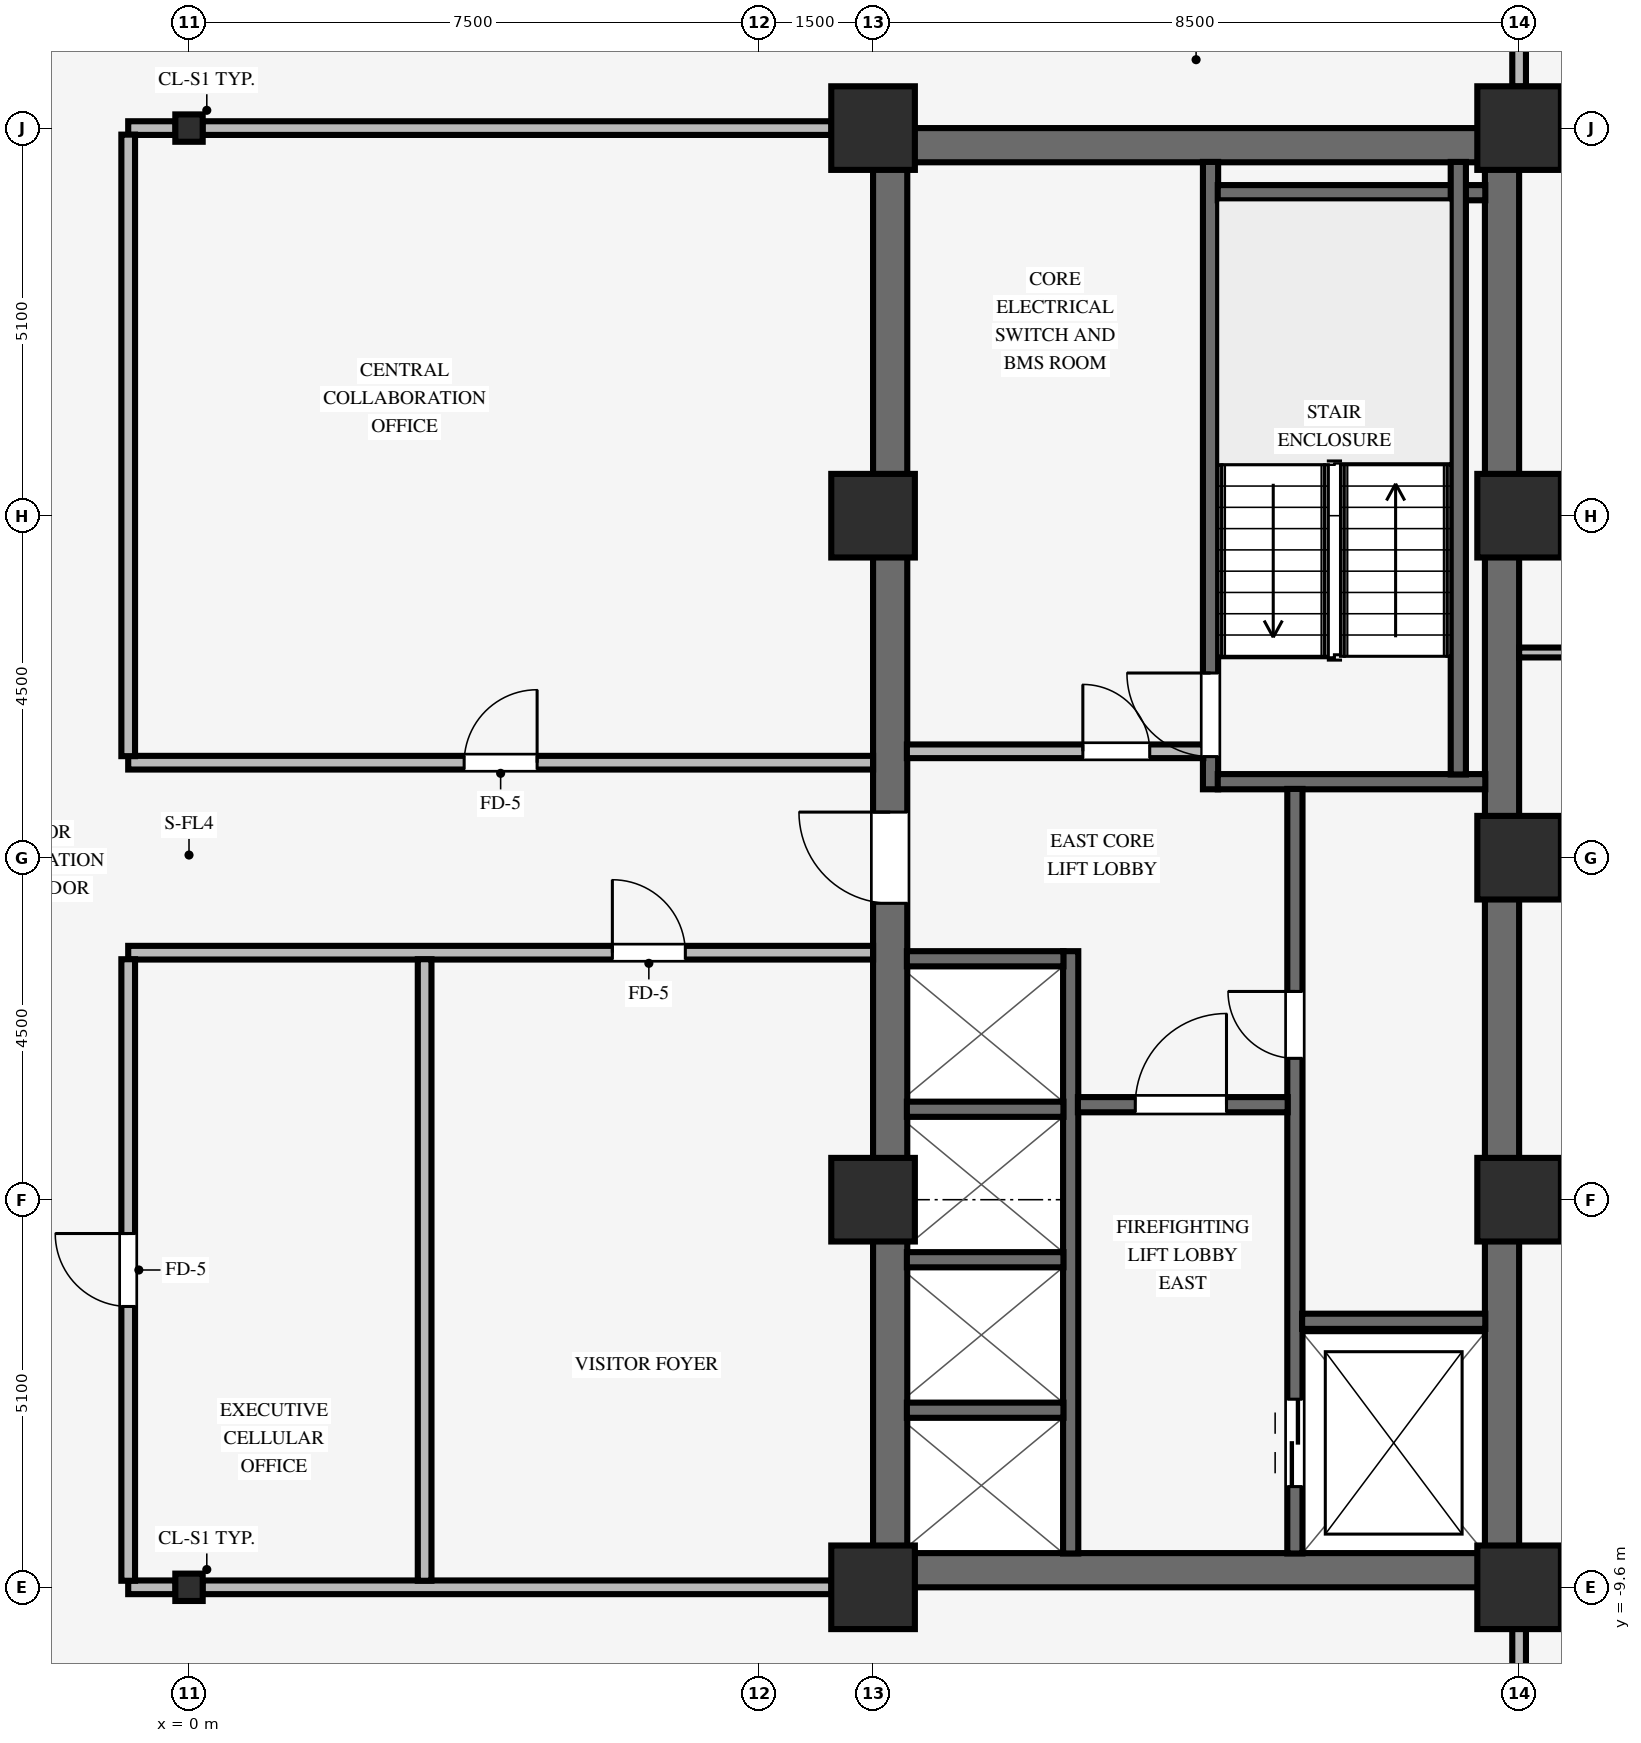
"""IFC4 building model, lengths in metres.
Left out: names, types, materials, properties, quantities, classifications, styles, units other than length and angle.
Written with IfcOpenShell. Run it as: python <this file> out.ifc"""

import sys

from ifc_helpers import new_model, si_unit, direction, frame, frame_2d, origin, origin_2d, place, context, subcontext, project, spatial, rectangle, i_section, extrude, source, transform, mapped, element, fill, save


model = new_model("IFC4")
c1 = context("Model", 3, precision=1e-05, world=origin(), true_north=direction((0.0, 1.0)))
c2 = subcontext(c1, "Body", "Model", "MODEL_VIEW")
j1 = project(units=[si_unit("LENGTHUNIT", "METRE"), si_unit("PLANEANGLEUNIT", "RADIAN")], contexts=[c1])
p1 = place(None, origin())
s1 = spatial("IfcSite", under=j1, at=p1, CompositionType="ELEMENT")
p2 = place(p1, origin())
s2 = spatial("IfcBuilding", under=s1, at=p2, CompositionType="ELEMENT")
p3 = place(p2, frame((0.0, 0.0, 89.65)))
s3 = spatial("IfcBuildingStorey", under=s2, at=p3, CompositionType="ELEMENT", Elevation=89.65)
for number, where, z_axis, x_axis in (
    (1, (9.0, -9.375, 0.0), (0.0, 0.0, 1.0), (1.0, 0.0, 0.0)),
    (2, (9.0, 9.375, 0.0), (0.0, 0.0, 1.0), (1.0, 0.0, 0.0)),
):
    element("IfcWall", number, at=place(p3, frame(where, z_axis=z_axis, x_axis=x_axis)), inside=s3, PredefinedType="SHEAR", context=c2, shape_type="SweptSolid", body=[
        extrude(rectangle(XDim=8.5, YDim=0.45, at=frame_2d((4.25, 0.0))), origin(), (0.0, 0.0, 1.0), 3.25),
    ])
p4 = place(p3, frame((9.225, -9.155, 0.0), z_axis=(0.0, 0.0, 1.0), x_axis=(0.0, 1.0, 0.0)))
e3 = element("IfcWall", 3, at=p4, inside=s3, PredefinedType="SHEAR", context=c2, shape_type="SweptSolid", body=[
    extrude(rectangle(XDim=18.31, YDim=0.45, at=frame_2d((9.155, 0.0))), origin(), (0.0, 0.0, 1.0), 3.25),
])
p5 = place(p4, frame((8.555, 0.0, 0.0)))
e4 = element("IfcOpeningElement", 4, at=p5, cuts=e3, PredefinedType="OPENING", context=c2, shape_type="SweptSolid", body=[
    extrude(rectangle(XDim=1.2, YDim=2.15, at=frame_2d((0.6, 1.075))), frame((0.0, 0.235, 0.0), z_axis=(0.0, -1.0, 0.0), x_axis=(1.0, 0.0, 0.0)), (0.0, 0.0, 1.0), 0.47),
])
p6 = place(p3, frame((17.275, -9.155, 0.0), z_axis=(0.0, 0.0, 1.0), x_axis=(0.0, 1.0, 0.0)))
e5 = element("IfcWall", 5, at=p6, inside=s3, PredefinedType="SHEAR", context=c2, shape_type="SweptSolid", body=[
    extrude(rectangle(XDim=18.31, YDim=0.45, at=frame_2d((9.155, 0.0))), origin(), (0.0, 0.0, 1.0), 3.25),
])
for number, where, z_axis, x_axis in (
    (6, (9.0, -9.6, 0.0), (0.0, 0.0, 1.0), (1.0, 0.0, 0.0)),
    (7, (9.0, -4.5, 0.0), (0.0, 0.0, 1.0), (1.0, 0.0, 0.0)),
    (8, (9.0, 4.5, 0.0), (0.0, 0.0, 1.0), (1.0, 0.0, 0.0)),
    (9, (9.0, 9.6, 0.0), (0.0, 0.0, 1.0), (1.0, 0.0, 0.0)),
    (10, (17.5, -9.6, 0.0), (0.0, 0.0, 1.0), (1.0, 0.0, 0.0)),
    (11, (17.5, -4.5, 0.0), (0.0, 0.0, 1.0), (1.0, 0.0, 0.0)),
    (12, (17.5, 4.5, 0.0), (0.0, 0.0, 1.0), (1.0, 0.0, 0.0)),
    (13, (17.5, 9.6, 0.0), (0.0, 0.0, 1.0), (1.0, 0.0, 0.0)),
    (14, (17.5, 0.0, 0.0), (0.0, 0.0, 1.0), (1.0, 0.0, 0.0)),
):
    element("IfcColumn", number, at=place(p3, frame(where, z_axis=z_axis, x_axis=x_axis)), inside=s3, PredefinedType="COLUMN", context=c2, shape_type="SweptSolid", body=[
        extrude(rectangle(XDim=1.1, YDim=1.1, at=origin_2d()), origin(), (0.0, 0.0, 1.0), 3.25),
    ])
for number, where, z_axis, x_axis in (
    (15, (0.0, -9.6, 0.0), (0.0, 0.0, 1.0), (1.0, 0.0, 0.0)),
    (16, (0.0, 9.6, 0.0), (0.0, 0.0, 1.0), (1.0, 0.0, 0.0)),
):
    element("IfcColumn", number, at=place(p3, frame(where, z_axis=z_axis, x_axis=x_axis)), inside=s3, PredefinedType="COLUMN", context=c2, shape_type="SweptSolid", body=[
        extrude(i_section(OverallWidth=0.36, OverallDepth=0.36, WebThickness=0.021, FlangeThickness=0.021, FilletRadius=0.018, at=origin_2d()), origin(), (0.0, 0.0, 1.0), 3.25),
    ])
p7 = place(p3, frame((13.44, 0.9, 0.0), z_axis=(0.0, 0.0, 1.0), x_axis=(0.0, 1.0, 0.0)))
e17 = element("IfcWall", 17, at=p7, inside=s3, PredefinedType="SHEAR", context=c2, shape_type="SweptSolid", body=[
    extrude(rectangle(XDim=8.255, YDim=0.2, at=frame_2d((4.127, 0.0))), origin(), (0.0, 0.0, 1.0), 3.25),
])
p8 = place(p7, frame((0.43, 0.0, 0.0)))
e18 = element("IfcOpeningElement", 18, at=p8, cuts=e17, PredefinedType="OPENING", context=c2, shape_type="SweptSolid", body=[
    extrude(rectangle(XDim=1.1, YDim=2.15, at=frame_2d((0.55, 1.075))), frame((0.0, 0.11, 0.0), z_axis=(0.0, -1.0, 0.0), x_axis=(1.0, 0.0, 0.0)), (0.0, 0.0, 1.0), 0.22),
])
for number, where, z_axis, x_axis in (
    (19, (13.535, 1.0, 0.0), (0.0, 0.0, 1.0), (1.0, 0.0, 0.0)),
    (20, (13.535, 8.75, 0.0), (0.0, 0.0, 1.0), (1.0, 0.0, 0.0)),
):
    element("IfcWall", number, at=place(p3, frame(where, z_axis=z_axis, x_axis=x_axis)), inside=s3, PredefinedType="SHEAR", context=c2, shape_type="SweptSolid", body=[
        extrude(rectangle(XDim=3.52, YDim=0.2, at=frame_2d((1.76, 0.0))), origin(), (0.0, 0.0, 1.0), 3.25),
    ])
p9 = place(p3, frame((16.7, 1.095, 0.0), z_axis=(0.0, 0.0, 1.0), x_axis=(0.0, 1.0, 0.0)))
e21 = element("IfcWall", 21, at=p9, inside=s3, PredefinedType="SHEAR", context=c2, shape_type="SweptSolid", body=[
    extrude(rectangle(XDim=8.06, YDim=0.2, at=frame_2d((4.03, 0.0))), origin(), (0.0, 0.0, 1.0), 3.25),
])
p10 = place(p3, frame((14.55, -9.155, 0.0), z_axis=(0.0, 0.0, 1.0), x_axis=(0.0, 1.0, 0.0)))
e22 = element("IfcWall", 22, at=p10, inside=s3, PredefinedType="SHEAR", context=c2, shape_type="SweptSolid", body=[
    extrude(rectangle(XDim=10.06, YDim=0.2, at=frame_2d((5.03, 0.0))), origin(), (0.0, 0.0, 1.0), 3.25),
])
p11 = place(p10, frame((6.515, 0.0, 0.0)))
e23 = element("IfcOpeningElement", 23, at=p11, cuts=e22, PredefinedType="OPENING", context=c2, shape_type="SweptSolid", body=[
    extrude(rectangle(XDim=0.88, YDim=2.1, at=frame_2d((0.44, 1.05))), frame((0.0, 0.11, 0.0), z_axis=(0.0, -1.0, 0.0), x_axis=(1.0, 0.0, 0.0)), (0.0, 0.0, 1.0), 0.22),
])
p12 = place(p10, frame((0.88, 0.0, 0.0)))
e24 = element("IfcOpeningElement", 24, at=p12, cuts=e22, PredefinedType="OPENING", context=c2, shape_type="SweptSolid", body=[
    extrude(rectangle(XDim=1.15, YDim=2.15, at=frame_2d((0.575, 1.075))), frame((0.0, 0.11, 0.0), z_axis=(0.0, -1.0, 0.0), x_axis=(1.0, 0.0, 0.0)), (0.0, 0.0, 1.0), 0.22),
])
p13 = place(p3, frame((14.645, -6.1, 0.0), z_axis=(0.0, 0.0, 1.0), x_axis=(1.0, 0.0, 0.0)))
e25 = element("IfcWall", 25, at=p13, inside=s3, PredefinedType="SHEAR", context=c2, shape_type="SweptSolid", body=[
    extrude(rectangle(XDim=2.41, YDim=0.2, at=frame_2d((1.205, 0.0))), origin(), (0.0, 0.0, 1.0), 3.25),
])
p14 = place(p3, frame((11.6, -9.155, 0.0), z_axis=(0.0, 0.0, 1.0), x_axis=(0.0, 1.0, 0.0)))
e26 = element("IfcWall", 26, at=p14, inside=s3, PredefinedType="SHEAR", context=c2, shape_type="SweptSolid", body=[
    extrude(rectangle(XDim=7.925, YDim=0.2, at=frame_2d((3.962, 0.0))), origin(), (0.0, 0.0, 1.0), 3.25),
])
p15 = place(p3, frame((11.695, -3.25, 0.0), z_axis=(0.0, 0.0, 1.0), x_axis=(1.0, 0.0, 0.0)))
e27 = element("IfcWall", 27, at=p15, inside=s3, PredefinedType="SHEAR", context=c2, shape_type="SweptSolid", body=[
    extrude(rectangle(XDim=2.76, YDim=0.2, at=frame_2d((1.38, 0.0))), origin(), (0.0, 0.0, 1.0), 3.25),
])
p16 = place(p15, frame((0.755, 0.0, 0.0)))
e28 = element("IfcOpeningElement", 28, at=p16, cuts=e27, PredefinedType="OPENING", context=c2, shape_type="SweptSolid", body=[
    extrude(rectangle(XDim=1.2, YDim=2.15, at=frame_2d((0.6, 1.075))), frame((0.0, 0.11, 0.0), z_axis=(0.0, -1.0, 0.0), x_axis=(1.0, 0.0, 0.0)), (0.0, 0.0, 1.0), 0.22),
])
for number, where, z_axis, x_axis in (
    (29, (9.445, -7.27, 0.0), (0.0, 0.0, 1.0), (1.0, 0.0, 0.0)),
    (30, (9.445, -5.29, 0.0), (0.0, 0.0, 1.0), (1.0, 0.0, 0.0)),
    (31, (9.445, -3.31, 0.0), (0.0, 0.0, 1.0), (1.0, 0.0, 0.0)),
    (32, (9.445, -1.33, 0.0), (0.0, 0.0, 1.0), (1.0, 0.0, 0.0)),
):
    element("IfcWall", number, at=place(p3, frame(where, z_axis=z_axis, x_axis=x_axis)), inside=s3, PredefinedType="SHEAR", context=c2, shape_type="SweptSolid", body=[
        extrude(rectangle(XDim=2.06, YDim=0.2, at=frame_2d((1.03, 0.0))), origin(), (0.0, 0.0, 1.0), 3.25),
    ])
p17 = place(p3, frame((9.445, 1.4, 0.0), z_axis=(0.0, 0.0, 1.0), x_axis=(1.0, 0.0, 0.0)))
e33 = element("IfcWall", 33, at=p17, inside=s3, PredefinedType="PARTITIONING", context=c2, shape_type="SweptSolid", body=[
    extrude(rectangle(XDim=3.9, YDim=0.18, at=frame_2d((1.95, 0.0))), origin(), (0.0, 0.0, 1.0), 3.24),
])
p18 = place(p17, frame((2.315, 0.0, 0.0)))
e34 = element("IfcOpeningElement", 34, at=p18, cuts=e33, PredefinedType="OPENING", context=c2, shape_type="SweptSolid", body=[
    extrude(rectangle(XDim=0.88, YDim=2.1, at=frame_2d((0.44, 1.05))), frame((0.0, 0.1, 0.0), z_axis=(0.0, -1.0, 0.0), x_axis=(1.0, 0.0, 0.0)), (0.0, 0.0, 1.0), 0.2),
])
p19 = place(p3, frame((-0.8, -9.6, 0.0), z_axis=(0.0, 0.0, 1.0), x_axis=(1.0, 0.0, 0.0)))
e35 = element("IfcWall", 35, at=p19, inside=s3, PredefinedType="PARTITIONING", context=c2, shape_type="SweptSolid", body=[
    extrude(rectangle(XDim=0.624, YDim=0.18, at=frame_2d((0.312, 0.0))), origin(), (0.0, 0.0, 1.0), 2.285),
])
p20 = place(p3, frame((0.176, -9.6, 0.0), z_axis=(0.0, 0.0, 1.0), x_axis=(1.0, 0.0, 0.0)))
e36 = element("IfcWall", 36, at=p20, inside=s3, PredefinedType="PARTITIONING", context=c2, shape_type="SweptSolid", body=[
    extrude(rectangle(XDim=8.278, YDim=0.18, at=frame_2d((4.139, 0.0))), origin(), (0.0, 0.0, 1.0), 2.285),
])
p21 = place(p3, frame((-0.8, -1.25, 0.0), z_axis=(0.0, 0.0, 1.0), x_axis=(1.0, 0.0, 0.0)))
e37 = element("IfcWall", 37, at=p21, inside=s3, PredefinedType="PARTITIONING", context=c2, shape_type="SweptSolid", body=[
    extrude(rectangle(XDim=9.8, YDim=0.18, at=frame_2d((4.9, 0.0))), origin(), (0.0, 0.0, 1.0), 3.24),
])
p22 = place(p21, frame((6.37, 0.0, 0.0)))
e38 = element("IfcOpeningElement", 38, at=p22, cuts=e37, PredefinedType="OPENING", context=c2, shape_type="SweptSolid", body=[
    extrude(rectangle(XDim=0.96, YDim=2.1, at=frame_2d((0.48, 1.05))), frame((0.0, 0.1, 0.0), z_axis=(0.0, -1.0, 0.0), x_axis=(1.0, 0.0, 0.0)), (0.0, 0.0, 1.0), 0.2),
])
p23 = place(p3, frame((-0.8, 1.25, 0.0), z_axis=(0.0, 0.0, 1.0), x_axis=(1.0, 0.0, 0.0)))
e39 = element("IfcWall", 39, at=p23, inside=s3, PredefinedType="PARTITIONING", context=c2, shape_type="SweptSolid", body=[
    extrude(rectangle(XDim=9.8, YDim=0.18, at=frame_2d((4.9, 0.0))), origin(), (0.0, 0.0, 1.0), 3.24),
])
p24 = place(p23, frame((4.42, 0.0, 0.0)))
e40 = element("IfcOpeningElement", 40, at=p24, cuts=e39, PredefinedType="OPENING", context=c2, shape_type="SweptSolid", body=[
    extrude(rectangle(XDim=0.96, YDim=2.1, at=frame_2d((0.48, 1.05))), frame((0.0, 0.1, 0.0), z_axis=(0.0, -1.0, 0.0), x_axis=(1.0, 0.0, 0.0)), (0.0, 0.0, 1.0), 0.2),
])
p25 = place(p3, frame((17.5, 2.7, 0.0), z_axis=(0.0, 0.0, 1.0), x_axis=(1.0, 0.0, 0.0)))
e41 = element("IfcWall", 41, at=p25, inside=s3, PredefinedType="PARTITIONING", context=c2, shape_type="SweptSolid", body=[
    extrude(rectangle(XDim=6.18, YDim=0.13, at=frame_2d((3.09, 0.0))), origin(), (0.0, 0.0, 1.0), 3.24),
])
p26 = place(p3, frame((-0.8, 9.6, 0.0), z_axis=(0.0, 0.0, 1.0), x_axis=(1.0, 0.0, 0.0)))
e42 = element("IfcWall", 42, at=p26, inside=s3, PredefinedType="PARTITIONING", context=c2, shape_type="SweptSolid", body=[
    extrude(rectangle(XDim=0.624, YDim=0.18, at=frame_2d((0.312, 0.0))), origin(), (0.0, 0.0, 1.0), 2.285),
])
p27 = place(p3, frame((0.176, 9.6, 0.0), z_axis=(0.0, 0.0, 1.0), x_axis=(1.0, 0.0, 0.0)))
e43 = element("IfcWall", 43, at=p27, inside=s3, PredefinedType="PARTITIONING", context=c2, shape_type="SweptSolid", body=[
    extrude(rectangle(XDim=8.278, YDim=0.18, at=frame_2d((4.139, 0.0))), origin(), (0.0, 0.0, 1.0), 2.285),
])
p28 = place(p3, frame((-0.8, -9.514, 0.0), z_axis=(0.0, 0.0, 1.0), x_axis=(0.0, 1.0, 0.0)))
e44 = element("IfcWall", 44, at=p28, inside=s3, PredefinedType="PARTITIONING", context=c2, shape_type="SweptSolid", body=[
    extrude(rectangle(XDim=8.178, YDim=0.18, at=frame_2d((4.089, 0.0))), origin(), (0.0, 0.0, 1.0), 3.24),
])
p29 = place(p28, frame((3.609, 0.0, 0.0)))
e45 = element("IfcOpeningElement", 45, at=p29, cuts=e44, PredefinedType="OPENING", context=c2, shape_type="SweptSolid", body=[
    extrude(rectangle(XDim=0.96, YDim=2.1, at=frame_2d((0.48, 1.05))), frame((0.0, 0.1, 0.0), z_axis=(0.0, -1.0, 0.0), x_axis=(1.0, 0.0, 0.0)), (0.0, 0.0, 1.0), 0.2),
])
for number, where, z_axis, x_axis in (
    (46, (-0.8, 1.336, 0.0), (0.0, 0.0, 1.0), (0.0, 1.0, 0.0)),
    (47, (3.1, -9.514, 0.0), (0.0, 0.0, 1.0), (0.0, 1.0, 0.0)),
):
    element("IfcWall", number, at=place(p3, frame(where, z_axis=z_axis, x_axis=x_axis)), inside=s3, PredefinedType="PARTITIONING", context=c2, shape_type="SweptSolid", body=[
        extrude(rectangle(XDim=8.178, YDim=0.18, at=frame_2d((4.089, 0.0))), origin(), (0.0, 0.0, 1.0), 3.24),
    ])
for number, where, z_axis, x_axis in (
    (48, (17.5, -11.114, 0.0), (0.0, 0.0, 1.0), (0.0, 1.0, 0.0)),
    (49, (17.5, 10.146, 0.0), (0.0, 0.0, 1.0), (0.0, 1.0, 0.0)),
):
    element("IfcWall", number, at=place(p3, frame(where, z_axis=z_axis, x_axis=x_axis)), inside=s3, PredefinedType="PARTITIONING", context=c2, shape_type="SweptSolid", body=[
        extrude(rectangle(XDim=0.968, YDim=0.18, at=frame_2d((0.484, 0.0))), origin(), (0.0, 0.0, 1.0), 2.335),
    ])
m1 = source(origin(), c2, "Body", "SweptSolid", [
    extrude(rectangle(XDim=1.1, YDim=2.15, at=frame_2d((0.55, 1.075))), frame((0.0, 0.025, 0.0), z_axis=(0.0, -1.0, 0.0), x_axis=(1.0, 0.0, 0.0)), (0.0, 0.0, 1.0), 0.05),
])
p30 = place(p8, origin())
e50 = element("IfcDoor", 50, at=p30, inside=s3, OperationType="SINGLE_SWING_RIGHT", PredefinedType="DOOR", context=c2, shape_type="MappedRepresentation", body=[
    mapped(m1, transform((0.0, 0.0, 0.0), scale=1.0)),
])
fill(e18, e50)
m2 = source(origin(), c2, "Body", "SweptSolid", [
    extrude(rectangle(XDim=0.88, YDim=2.1, at=frame_2d((0.44, 1.05))), frame((0.0, 0.025, 0.0), z_axis=(0.0, -1.0, 0.0), x_axis=(1.0, 0.0, 0.0)), (0.0, 0.0, 1.0), 0.05),
])
p31 = place(p11, origin())
e51 = element("IfcDoor", 51, at=p31, inside=s3, OperationType="SINGLE_SWING_RIGHT", PredefinedType="DOOR", context=c2, shape_type="MappedRepresentation", body=[
    mapped(m2, transform((0.0, 0.0, 0.0), scale=1.0)),
])
fill(e23, e51)
m3 = source(origin(), c2, "Body", "SweptSolid", [
    extrude(rectangle(XDim=1.2, YDim=2.15, at=frame_2d((0.6, 1.075))), frame((0.0, 0.025, 0.0), z_axis=(0.0, -1.0, 0.0), x_axis=(1.0, 0.0, 0.0)), (0.0, 0.0, 1.0), 0.05),
])
p32 = place(p16, origin())
e52 = element("IfcDoor", 52, at=p32, inside=s3, OperationType="SINGLE_SWING_RIGHT", PredefinedType="DOOR", context=c2, shape_type="MappedRepresentation", body=[
    mapped(m3, transform((0.0, 0.0, 0.0), scale=1.0)),
])
fill(e28, e52)
p33 = place(p5, origin())
e53 = element("IfcDoor", 53, at=p33, inside=s3, OperationType="SINGLE_SWING_RIGHT", PredefinedType="DOOR", context=c2, shape_type="MappedRepresentation", body=[
    mapped(m3, transform((0.0, 0.0, 0.0), scale=1.0)),
])
fill(e4, e53)
p34 = place(p18, origin())
e54 = element("IfcDoor", 54, at=p34, inside=s3, OperationType="SINGLE_SWING_LEFT", PredefinedType="DOOR", context=c2, shape_type="MappedRepresentation", body=[
    mapped(m2, transform((0.0, 0.0, 0.0), scale=1.0)),
])
fill(e34, e54)
m4 = source(origin(), c2, "Body", "SweptSolid", [
    extrude(rectangle(XDim=1.15, YDim=2.15, at=frame_2d((0.575, 1.075))), frame((0.0, 0.025, 0.0), z_axis=(0.0, -1.0, 0.0), x_axis=(1.0, 0.0, 0.0)), (0.0, 0.0, 1.0), 0.05),
])
p35 = place(p12, origin())
e55 = element("IfcDoor", 55, at=p35, inside=s3, OperationType="DOUBLE_DOOR_SLIDING", PredefinedType="DOOR", context=c2, shape_type="MappedRepresentation", body=[
    mapped(m4, transform((0.0, 0.0, 0.0), scale=1.0)),
])
fill(e24, e55)
m5 = source(origin(), c2, "Body", "SweptSolid", [
    extrude(rectangle(XDim=0.96, YDim=2.1, at=frame_2d((0.48, 1.05))), frame((0.0, 0.025, 0.0), z_axis=(0.0, -1.0, 0.0), x_axis=(1.0, 0.0, 0.0)), (0.0, 0.0, 1.0), 0.05),
])
p36 = place(p24, origin())
e56 = element("IfcDoor", 56, at=p36, inside=s3, OperationType="SINGLE_SWING_RIGHT", PredefinedType="DOOR", context=c2, shape_type="MappedRepresentation", body=[
    mapped(m5, transform((0.0, 0.0, 0.0), scale=1.0)),
])
fill(e40, e56)
p37 = place(p29, origin())
e57 = element("IfcDoor", 57, at=p37, inside=s3, OperationType="SINGLE_SWING_RIGHT", PredefinedType="DOOR", context=c2, shape_type="MappedRepresentation", body=[
    mapped(m5, transform((0.0, 0.0, 0.0), scale=1.0)),
])
fill(e45, e57)
p38 = place(p22, origin())
e58 = element("IfcDoor", 58, at=p38, inside=s3, OperationType="SINGLE_SWING_LEFT", PredefinedType="DOOR", context=c2, shape_type="MappedRepresentation", body=[
    mapped(m5, transform((0.0, 0.0, 0.0), scale=1.0)),
])
fill(e38, e58)
save(model, sys.argv[1])
